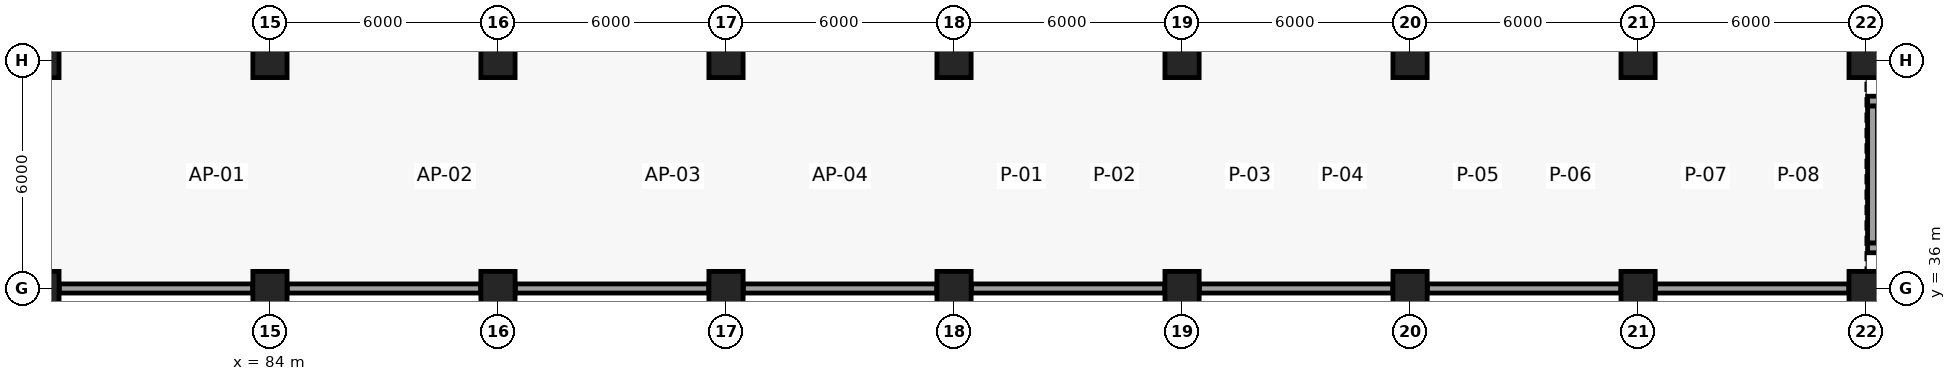
"""IFC4 building model, lengths in metres.
Left out: names, types, materials, properties, quantities, classifications, styles, units other than length and angle.
Written with IfcOpenShell. Run it as: python <this file> out.ifc"""

import sys

from ifc_helpers import new_model, si_unit, direction, frame, frame_2d, origin, origin_2d, place, context, subcontext, project, spatial, rectangle, extrude, element, save


model = new_model("IFC4")
c1 = context("Model", 3, precision=1e-05, world=origin(), true_north=direction((0.0, 1.0)))
c2 = subcontext(c1, "Body", "Model", "MODEL_VIEW")
j1 = project(units=[si_unit("LENGTHUNIT", "METRE"), si_unit("PLANEANGLEUNIT", "RADIAN")], contexts=[c1])
p1 = place(None, origin())
s1 = spatial("IfcSite", under=j1, at=p1, CompositionType="ELEMENT")
p2 = place(p1, origin())
s2 = spatial("IfcBuilding", under=s1, at=p2, CompositionType="ELEMENT")
p3 = place(p2, frame((0.0, 0.0, -4.8)))
s3 = spatial("IfcBuildingStorey", under=s2, at=p3, CompositionType="ELEMENT", Elevation=-4.8)
for number, where, z_axis, x_axis in (
    (1, (78.0, 36.0, 0.0), (0.0, 0.0, 1.0), (1.0, 0.0, 0.0)),
    (2, (78.0, 42.0, 0.0), (0.0, 0.0, 1.0), (1.0, 0.0, 0.0)),
    (3, (84.0, 36.0, 0.0), (0.0, 0.0, 1.0), (1.0, 0.0, 0.0)),
    (4, (84.0, 42.0, 0.0), (0.0, 0.0, 1.0), (1.0, 0.0, 0.0)),
    (5, (90.0, 36.0, 0.0), (0.0, 0.0, 1.0), (1.0, 0.0, 0.0)),
    (6, (90.0, 42.0, 0.0), (0.0, 0.0, 1.0), (1.0, 0.0, 0.0)),
    (7, (96.0, 36.0, 0.0), (0.0, 0.0, 1.0), (1.0, 0.0, 0.0)),
    (8, (96.0, 42.0, 0.0), (0.0, 0.0, 1.0), (1.0, 0.0, 0.0)),
    (9, (102.0, 36.0, 0.0), (0.0, 0.0, 1.0), (1.0, 0.0, 0.0)),
    (10, (102.0, 42.0, 0.0), (0.0, 0.0, 1.0), (1.0, 0.0, 0.0)),
    (11, (108.0, 36.0, 0.0), (0.0, 0.0, 1.0), (1.0, 0.0, 0.0)),
    (12, (108.0, 42.0, 0.0), (0.0, 0.0, 1.0), (1.0, 0.0, 0.0)),
    (13, (114.0, 36.0, 0.0), (0.0, 0.0, 1.0), (1.0, 0.0, 0.0)),
    (14, (114.0, 42.0, 0.0), (0.0, 0.0, 1.0), (1.0, 0.0, 0.0)),
    (15, (120.0, 36.0, 0.0), (0.0, 0.0, 1.0), (1.0, 0.0, 0.0)),
    (16, (120.0, 42.0, 0.0), (0.0, 0.0, 1.0), (1.0, 0.0, 0.0)),
    (17, (126.0, 36.0, 0.0), (0.0, 0.0, 1.0), (1.0, 0.0, 0.0)),
    (18, (126.0, 42.0, 0.0), (0.0, 0.0, 1.0), (1.0, 0.0, 0.0)),
):
    element("IfcColumn", number, at=place(p3, frame(where, z_axis=z_axis, x_axis=x_axis)), inside=s3, PredefinedType="COLUMN", context=c2, shape_type="SweptSolid", body=[
        extrude(rectangle(XDim=0.9, YDim=0.9, at=origin_2d()), origin(), (0.0, 0.0, 1.0), 4.8),
    ])
for number, where, z_axis, x_axis in (
    (19, (126.04, 37.07, -0.5), (0.0, 0.0, 1.0), (1.0, 0.0, 0.0)),
    (20, (126.04, 40.93, -0.5), (0.0, 0.0, 1.0), (1.0, 0.0, 0.0)),
):
    element("IfcWall", number, at=place(p3, frame(where, z_axis=z_axis, x_axis=x_axis)), inside=s3, PredefinedType="SHEAR", context=c2, shape_type="SweptSolid", body=[
        extrude(rectangle(XDim=10.72, YDim=0.26, at=frame_2d((5.36, 0.0))), origin(), (0.0, 0.0, 1.0), 5.3),
    ])
p4 = place(p3, frame((126.17, 37.2, -0.5), z_axis=(0.0, 0.0, 1.0), x_axis=(0.0, 1.0, 0.0)))
e21 = element("IfcWall", 21, at=p4, inside=s3, PredefinedType="SHEAR", context=c2, shape_type="SweptSolid", body=[
    extrude(rectangle(XDim=3.6, YDim=0.26, at=frame_2d((1.8, 0.0))), origin(), (0.0, 0.0, 1.0), 5.3),
])
p5 = place(p3, frame((78.455, 36.0, 0.0), z_axis=(0.0, 0.0, 1.0), x_axis=(1.0, 0.0, 0.0)))
e22 = element("IfcWall", 22, at=p5, inside=s3, PredefinedType="PARTITIONING", context=c2, shape_type="SweptSolid", body=[
    extrude(rectangle(XDim=5.09, YDim=0.24, at=frame_2d((2.545, 0.0))), origin(), (0.0, 0.0, 1.0), 4.05),
])
p6 = place(p3, frame((84.455, 36.0, 0.0), z_axis=(0.0, 0.0, 1.0), x_axis=(1.0, 0.0, 0.0)))
e23 = element("IfcWall", 23, at=p6, inside=s3, PredefinedType="PARTITIONING", context=c2, shape_type="SweptSolid", body=[
    extrude(rectangle(XDim=5.09, YDim=0.24, at=frame_2d((2.545, 0.0))), origin(), (0.0, 0.0, 1.0), 4.21),
])
for number, where, z_axis, x_axis in (
    (24, (90.455, 36.0, 0.0), (0.0, 0.0, 1.0), (1.0, 0.0, 0.0)),
    (25, (96.455, 36.0, 0.0), (0.0, 0.0, 1.0), (1.0, 0.0, 0.0)),
    (26, (102.455, 36.0, 0.0), (0.0, 0.0, 1.0), (1.0, 0.0, 0.0)),
    (27, (108.455, 36.0, 0.0), (0.0, 0.0, 1.0), (1.0, 0.0, 0.0)),
    (28, (114.455, 36.0, 0.0), (0.0, 0.0, 1.0), (1.0, 0.0, 0.0)),
    (29, (120.455, 36.0, 0.0), (0.0, 0.0, 1.0), (1.0, 0.0, 0.0)),
):
    element("IfcWall", number, at=place(p3, frame(where, z_axis=z_axis, x_axis=x_axis)), inside=s3, PredefinedType="PARTITIONING", context=c2, shape_type="SweptSolid", body=[
        extrude(rectangle(XDim=5.09, YDim=0.24, at=frame_2d((2.545, 0.0))), origin(), (0.0, 0.0, 1.0), 3.7),
    ])
save(model, sys.argv[1])
